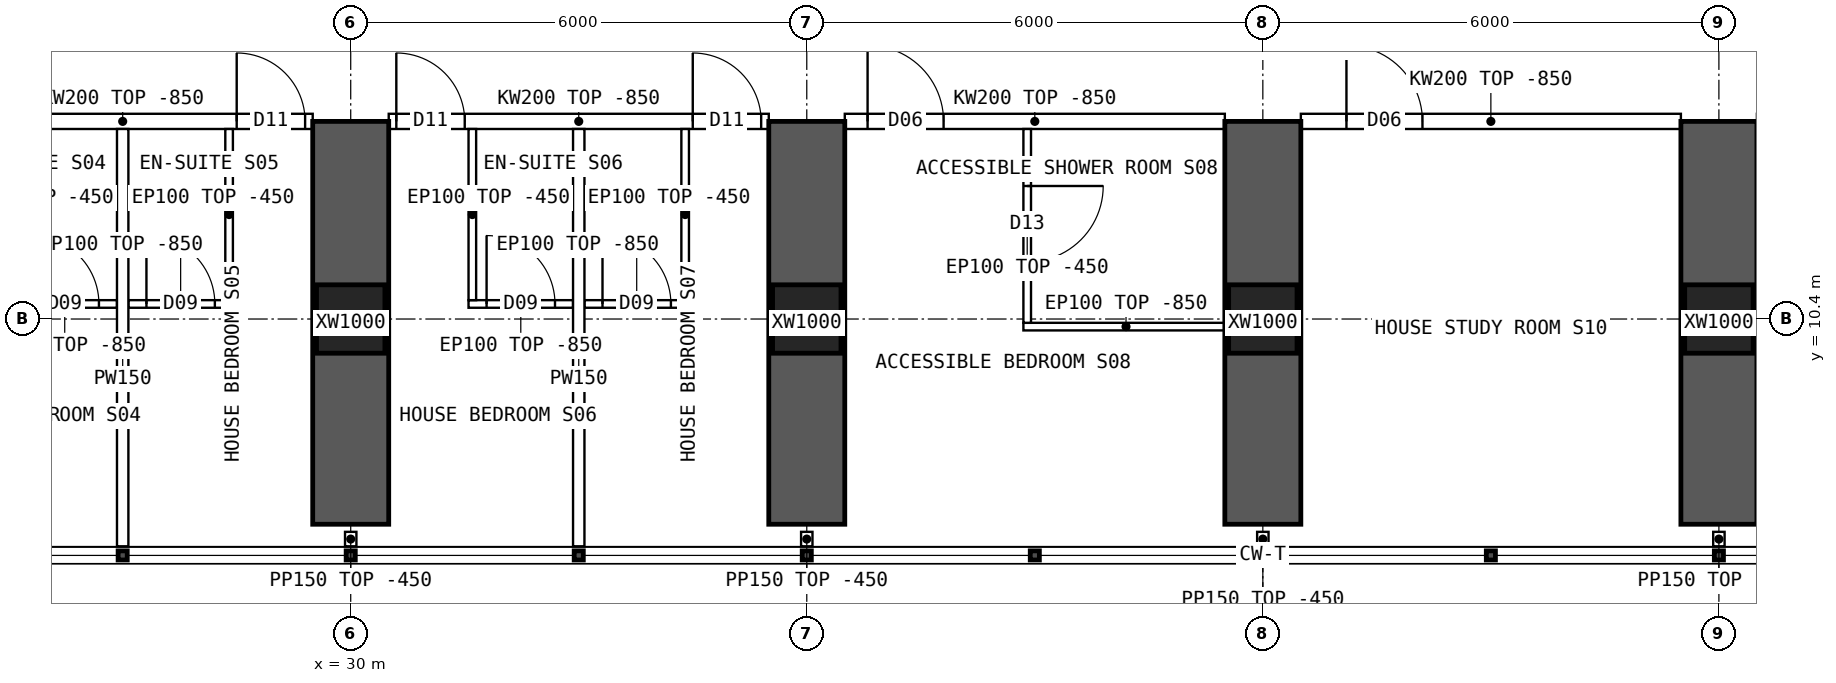
"""IFC4 building model, lengths in metres.
Left out: names, types, materials, properties, quantities, classifications, styles, units other than length and angle.
Written with IfcOpenShell. Run it as: python <this file> out.ifc"""

import sys

from ifc_helpers import new_model, si_unit, direction, frame, frame_2d, origin, origin_2d, place, context, subcontext, project, spatial, polyline, rectangle, hollow_rectangle, outline, extrude, element, fill, save


model = new_model("IFC4")
c1 = context("Model", 3, precision=1e-05, world=origin(), true_north=direction((0.0, 1.0)))
c2 = subcontext(c1, "Body", "Model", "MODEL_VIEW")
j1 = project(units=[si_unit("LENGTHUNIT", "METRE"), si_unit("PLANEANGLEUNIT", "RADIAN")], contexts=[c1])
p1 = place(None, origin())
s1 = spatial("IfcSite", under=j1, at=p1, CompositionType="ELEMENT")
p2 = place(p1, origin())
s2 = spatial("IfcBuilding", under=s1, at=p2, CompositionType="ELEMENT")
p3 = place(p2, frame((0.0, 0.0, 35.2)))
s3 = spatial("IfcBuildingStorey", under=s2, at=p3, CompositionType="ELEMENT", Elevation=35.2)
for number, where, z_axis, x_axis in (
    (1, (30.0, 10.4, 0.0), (0.0, 0.0, 1.0), (1.0, 0.0, 0.0)),
    (2, (36.0, 10.4, 0.0), (0.0, 0.0, 1.0), (1.0, 0.0, 0.0)),
    (3, (42.0, 10.4, 0.0), (0.0, 0.0, 1.0), (1.0, 0.0, 0.0)),
    (4, (48.0, 10.4, 0.0), (0.0, 0.0, 1.0), (1.0, 0.0, 0.0)),
):
    element("IfcColumn", number, at=place(p3, frame(where, z_axis=z_axis, x_axis=x_axis)), inside=s3, PredefinedType="COLUMN", context=c2, shape_type="SweptSolid", body=[
        extrude(hollow_rectangle(XDim=0.9, YDim=0.9, WallThickness=0.09, at=origin_2d()), origin(), (0.0, 0.0, 1.0), 3.75),
    ])
for number, where, z_axis, x_axis in (
    (5, (30.0, 7.7, 0.0), (0.0, 0.0, 1.0), (0.0, 1.0, 0.0)),
    (6, (36.0, 7.7, 0.0), (0.0, 0.0, 1.0), (0.0, 1.0, 0.0)),
    (7, (42.0, 7.7, 0.0), (0.0, 0.0, 1.0), (0.0, 1.0, 0.0)),
    (8, (48.0, 7.7, 0.0), (0.0, 0.0, 1.0), (0.0, 1.0, 0.0)),
):
    element("IfcWall", number, at=place(p3, frame(where, z_axis=z_axis, x_axis=x_axis)), inside=s3, PredefinedType="SHEAR", context=c2, shape_type="SweptSolid", body=[
        extrude(rectangle(XDim=5.3, YDim=1.0, at=frame_2d((2.65, 0.0))), origin(), (0.0, 0.0, 1.0), 3.75),
    ])
p4 = place(p3, frame((24.5, 13.0, 0.0), z_axis=(0.0, 0.0, 1.0), x_axis=(1.0, 0.0, 0.0)))
e9 = element("IfcWall", 9, at=p4, inside=s3, PredefinedType="SOLIDWALL", context=c2, shape_type="SweptSolid", body=[
    extrude(outline(polyline([(0.0, 0.0), (5.0, 0.0), (5.0, 2.9), (0.0, 2.9), (0.0, 0.0)])), frame((0.0, 0.1, 0.0), z_axis=(0.0, -1.0, 0.0), x_axis=(1.0, 0.0, 0.0)), (0.0, 0.0, 1.0), 0.2),
])
p5 = place(p4, frame((0.1, 0.0, 0.0)))
e10 = element("IfcOpeningElement", 10, at=p5, cuts=e9, PredefinedType="OPENING", context=c2, shape_type="SweptSolid", body=[
    extrude(rectangle(XDim=0.9, YDim=2.1, at=frame_2d((0.45, 1.05))), frame((0.0, 0.11, 0.0), z_axis=(0.0, -1.0, 0.0), x_axis=(1.0, 0.0, 0.0)), (0.0, 0.0, 1.0), 0.22),
])
p6 = place(p4, frame((4.0, 0.0, 0.0)))
e11 = element("IfcOpeningElement", 11, at=p6, cuts=e9, PredefinedType="OPENING", context=c2, shape_type="SweptSolid", body=[
    extrude(rectangle(XDim=0.9, YDim=2.1, at=frame_2d((0.45, 1.05))), frame((0.0, 0.11, 0.0), z_axis=(0.0, -1.0, 0.0), x_axis=(1.0, 0.0, 0.0)), (0.0, 0.0, 1.0), 0.22),
])
p7 = place(p3, frame((30.5, 13.0, 0.0), z_axis=(0.0, 0.0, 1.0), x_axis=(1.0, 0.0, 0.0)))
e12 = element("IfcWall", 12, at=p7, inside=s3, PredefinedType="SOLIDWALL", context=c2, shape_type="SweptSolid", body=[
    extrude(outline(polyline([(0.0, 0.0), (5.0, 0.0), (5.0, 2.9), (0.0, 2.9), (0.0, 0.0)])), frame((0.0, 0.1, 0.0), z_axis=(0.0, -1.0, 0.0), x_axis=(1.0, 0.0, 0.0)), (0.0, 0.0, 1.0), 0.2),
])
p8 = place(p7, frame((0.1, 0.0, 0.0)))
e13 = element("IfcOpeningElement", 13, at=p8, cuts=e12, PredefinedType="OPENING", context=c2, shape_type="SweptSolid", body=[
    extrude(rectangle(XDim=0.9, YDim=2.1, at=frame_2d((0.45, 1.05))), frame((0.0, 0.11, 0.0), z_axis=(0.0, -1.0, 0.0), x_axis=(1.0, 0.0, 0.0)), (0.0, 0.0, 1.0), 0.22),
])
p9 = place(p7, frame((4.0, 0.0, 0.0)))
e14 = element("IfcOpeningElement", 14, at=p9, cuts=e12, PredefinedType="OPENING", context=c2, shape_type="SweptSolid", body=[
    extrude(rectangle(XDim=0.9, YDim=2.1, at=frame_2d((0.45, 1.05))), frame((0.0, 0.11, 0.0), z_axis=(0.0, -1.0, 0.0), x_axis=(1.0, 0.0, 0.0)), (0.0, 0.0, 1.0), 0.22),
])
p10 = place(p3, frame((36.5, 13.0, 0.0), z_axis=(0.0, 0.0, 1.0), x_axis=(1.0, 0.0, 0.0)))
e15 = element("IfcWall", 15, at=p10, inside=s3, PredefinedType="SOLIDWALL", context=c2, shape_type="SweptSolid", body=[
    extrude(outline(polyline([(0.0, 0.0), (5.0, 0.0), (5.0, 2.9), (0.0, 2.9), (0.0, 0.0)])), frame((0.0, 0.1, 0.0), z_axis=(0.0, -1.0, 0.0), x_axis=(1.0, 0.0, 0.0)), (0.0, 0.0, 1.0), 0.2),
])
p11 = place(p10, frame((0.3, 0.0, 0.0)))
e16 = element("IfcOpeningElement", 16, at=p11, cuts=e15, PredefinedType="OPENING", context=c2, shape_type="SweptSolid", body=[
    extrude(rectangle(XDim=1.0, YDim=2.1, at=frame_2d((0.5, 1.05))), frame((0.0, 0.11, 0.0), z_axis=(0.0, -1.0, 0.0), x_axis=(1.0, 0.0, 0.0)), (0.0, 0.0, 1.0), 0.22),
])
p12 = place(p3, frame((42.5, 13.0, 0.0), z_axis=(0.0, 0.0, 1.0), x_axis=(1.0, 0.0, 0.0)))
e17 = element("IfcWall", 17, at=p12, inside=s3, PredefinedType="SOLIDWALL", context=c2, shape_type="SweptSolid", body=[
    extrude(outline(polyline([(0.0, 0.0), (5.0, 0.0), (5.0, 2.9), (0.0, 2.9), (0.0, 0.0)])), frame((0.0, 0.1, 0.0), z_axis=(0.0, -1.0, 0.0), x_axis=(1.0, 0.0, 0.0)), (0.0, 0.0, 1.0), 0.2),
])
p13 = place(p12, frame((0.6, 0.0, 0.0)))
e18 = element("IfcOpeningElement", 18, at=p13, cuts=e17, PredefinedType="OPENING", context=c2, shape_type="SweptSolid", body=[
    extrude(rectangle(XDim=1.0, YDim=2.1, at=frame_2d((0.5, 1.05))), frame((0.0, 0.11, 0.0), z_axis=(0.0, -1.0, 0.0), x_axis=(1.0, 0.0, 0.0)), (0.0, 0.0, 1.0), 0.22),
])
p14 = place(p3, frame((27.0, 7.41, 0.0), z_axis=(0.0, 0.0, 1.0), x_axis=(0.0, 1.0, 0.0)))
e19 = element("IfcWall", 19, at=p14, inside=s3, PredefinedType="PARTITIONING", context=c2, shape_type="SweptSolid", body=[
    extrude(outline(polyline([(0.0, 0.0), (5.49, 0.0), (5.49, 2.9), (5.442, 2.9), (5.44, 3.3), (3.192, 3.3), (3.19, 2.9), (2.792, 2.9), (2.79, 3.3), (0.0, 3.3), (0.0, 0.0)])), frame((0.0, 0.075, 0.0), z_axis=(0.0, -1.0, 0.0), x_axis=(1.0, 0.0, 0.0)), (0.0, 0.0, 1.0), 0.15),
])
p15 = place(p3, frame((26.925, 10.598, 0.0), z_axis=(0.0, 0.0, 1.0), x_axis=(-1.0, 0.0, 0.0)))
e20 = element("IfcWall", 20, at=p15, inside=s3, PredefinedType="PARTITIONING", context=c2, shape_type="SweptSolid", body=[
    extrude(outline(polyline([(0.0, 0.0), (1.375, 0.0), (1.375, 2.9), (0.0, 2.9), (0.0, 0.0)])), frame((0.0, 0.05, 0.0), z_axis=(0.0, -1.0, 0.0), x_axis=(1.0, 0.0, 0.0)), (0.0, 0.0, 1.0), 0.1),
])
p16 = place(p15, frame((0.238, 0.0, 0.0)))
e21 = element("IfcOpeningElement", 21, at=p16, cuts=e20, PredefinedType="OPENING", context=c2, shape_type="SweptSolid", body=[
    extrude(rectangle(XDim=0.9, YDim=2.1, at=frame_2d((0.45, 1.05))), frame((0.0, 0.06, 0.0), z_axis=(0.0, -1.0, 0.0), x_axis=(1.0, 0.0, 0.0)), (0.0, 0.0, 1.0), 0.12),
])
p17 = place(p3, frame((28.45, 10.598, 0.0), z_axis=(0.0, 0.0, 1.0), x_axis=(-1.0, 0.0, 0.0)))
e22 = element("IfcWall", 22, at=p17, inside=s3, PredefinedType="PARTITIONING", context=c2, shape_type="SweptSolid", body=[
    extrude(outline(polyline([(0.0, 0.0), (1.375, 0.0), (1.375, 2.9), (0.0, 2.9), (0.0, 0.0)])), frame((0.0, 0.05, 0.0), z_axis=(0.0, -1.0, 0.0), x_axis=(1.0, 0.0, 0.0)), (0.0, 0.0, 1.0), 0.1),
])
p18 = place(p17, frame((0.238, 0.0, 0.0)))
e23 = element("IfcOpeningElement", 23, at=p18, cuts=e22, PredefinedType="OPENING", context=c2, shape_type="SweptSolid", body=[
    extrude(rectangle(XDim=0.9, YDim=2.1, at=frame_2d((0.45, 1.05))), frame((0.0, 0.06, 0.0), z_axis=(0.0, -1.0, 0.0), x_axis=(1.0, 0.0, 0.0)), (0.0, 0.0, 1.0), 0.12),
])
p19 = place(p3, frame((28.4, 10.648, 0.0), z_axis=(0.0, 0.0, 1.0), x_axis=(0.0, 1.0, 0.0)))
e24 = element("IfcWall", 24, at=p19, inside=s3, PredefinedType="PARTITIONING", context=c2, shape_type="SweptSolid", body=[
    extrude(outline(polyline([(0.0, 0.0), (2.252, 0.0), (2.252, 2.9), (2.204, 2.9), (2.202, 3.3), (0.0, 3.3), (0.0, 0.0)])), frame((0.0, 0.05, 0.0), z_axis=(0.0, -1.0, 0.0), x_axis=(1.0, 0.0, 0.0)), (0.0, 0.0, 1.0), 0.1),
])
p20 = place(p3, frame((33.0, 7.41, 0.0), z_axis=(0.0, 0.0, 1.0), x_axis=(0.0, 1.0, 0.0)))
e25 = element("IfcWall", 25, at=p20, inside=s3, PredefinedType="PARTITIONING", context=c2, shape_type="SweptSolid", body=[
    extrude(outline(polyline([(0.0, 0.0), (5.49, 0.0), (5.49, 2.9), (5.442, 2.9), (5.44, 3.3), (3.192, 3.3), (3.19, 2.9), (2.792, 2.9), (2.79, 3.3), (0.0, 3.3), (0.0, 0.0)])), frame((0.0, 0.075, 0.0), z_axis=(0.0, -1.0, 0.0), x_axis=(1.0, 0.0, 0.0)), (0.0, 0.0, 1.0), 0.15),
])
p21 = place(p3, frame((32.925, 10.598, 0.0), z_axis=(0.0, 0.0, 1.0), x_axis=(-1.0, 0.0, 0.0)))
e26 = element("IfcWall", 26, at=p21, inside=s3, PredefinedType="PARTITIONING", context=c2, shape_type="SweptSolid", body=[
    extrude(outline(polyline([(0.0, 0.0), (1.375, 0.0), (1.375, 2.9), (0.0, 2.9), (0.0, 0.0)])), frame((0.0, 0.05, 0.0), z_axis=(0.0, -1.0, 0.0), x_axis=(1.0, 0.0, 0.0)), (0.0, 0.0, 1.0), 0.1),
])
p22 = place(p21, frame((0.238, 0.0, 0.0)))
e27 = element("IfcOpeningElement", 27, at=p22, cuts=e26, PredefinedType="OPENING", context=c2, shape_type="SweptSolid", body=[
    extrude(rectangle(XDim=0.9, YDim=2.1, at=frame_2d((0.45, 1.05))), frame((0.0, 0.06, 0.0), z_axis=(0.0, -1.0, 0.0), x_axis=(1.0, 0.0, 0.0)), (0.0, 0.0, 1.0), 0.12),
])
p23 = place(p3, frame((31.6, 10.648, 0.0), z_axis=(0.0, 0.0, 1.0), x_axis=(0.0, 1.0, 0.0)))
e28 = element("IfcWall", 28, at=p23, inside=s3, PredefinedType="PARTITIONING", context=c2, shape_type="SweptSolid", body=[
    extrude(outline(polyline([(0.0, 0.0), (2.252, 0.0), (2.252, 2.9), (2.204, 2.9), (2.202, 3.3), (0.0, 3.3), (0.0, 0.0)])), frame((0.0, 0.05, 0.0), z_axis=(0.0, -1.0, 0.0), x_axis=(1.0, 0.0, 0.0)), (0.0, 0.0, 1.0), 0.1),
])
p24 = place(p3, frame((34.45, 10.598, 0.0), z_axis=(0.0, 0.0, 1.0), x_axis=(-1.0, 0.0, 0.0)))
e29 = element("IfcWall", 29, at=p24, inside=s3, PredefinedType="PARTITIONING", context=c2, shape_type="SweptSolid", body=[
    extrude(outline(polyline([(0.0, 0.0), (1.375, 0.0), (1.375, 2.9), (0.0, 2.9), (0.0, 0.0)])), frame((0.0, 0.05, 0.0), z_axis=(0.0, -1.0, 0.0), x_axis=(1.0, 0.0, 0.0)), (0.0, 0.0, 1.0), 0.1),
])
p25 = place(p24, frame((0.238, 0.0, 0.0)))
e30 = element("IfcOpeningElement", 30, at=p25, cuts=e29, PredefinedType="OPENING", context=c2, shape_type="SweptSolid", body=[
    extrude(rectangle(XDim=0.9, YDim=2.1, at=frame_2d((0.45, 1.05))), frame((0.0, 0.06, 0.0), z_axis=(0.0, -1.0, 0.0), x_axis=(1.0, 0.0, 0.0)), (0.0, 0.0, 1.0), 0.12),
])
p26 = place(p3, frame((34.4, 10.648, 0.0), z_axis=(0.0, 0.0, 1.0), x_axis=(0.0, 1.0, 0.0)))
e31 = element("IfcWall", 31, at=p26, inside=s3, PredefinedType="PARTITIONING", context=c2, shape_type="SweptSolid", body=[
    extrude(outline(polyline([(0.0, 0.0), (2.252, 0.0), (2.252, 2.9), (2.204, 2.9), (2.202, 3.3), (0.0, 3.3), (0.0, 0.0)])), frame((0.0, 0.05, 0.0), z_axis=(0.0, -1.0, 0.0), x_axis=(1.0, 0.0, 0.0)), (0.0, 0.0, 1.0), 0.1),
])
p27 = place(p3, frame((38.85, 10.3, 0.0), z_axis=(0.0, 0.0, 1.0), x_axis=(1.0, 0.0, 0.0)))
e32 = element("IfcWall", 32, at=p27, inside=s3, PredefinedType="PARTITIONING", context=c2, shape_type="SweptSolid", body=[
    extrude(outline(polyline([(0.0, 0.0), (2.7, 0.0), (2.7, 2.9), (0.0, 2.9), (0.0, 0.0)])), frame((0.0, 0.05, 0.0), z_axis=(0.0, -1.0, 0.0), x_axis=(1.0, 0.0, 0.0)), (0.0, 0.0, 1.0), 0.1),
])
p28 = place(p3, frame((38.9, 10.35, 0.0), z_axis=(0.0, 0.0, 1.0), x_axis=(0.0, 1.0, 0.0)))
e33 = element("IfcWall", 33, at=p28, inside=s3, PredefinedType="PARTITIONING", context=c2, shape_type="SweptSolid", body=[
    extrude(outline(polyline([(0.0, 0.0), (2.55, 0.0), (2.55, 2.9), (2.502, 2.9), (2.5, 3.3), (0.252, 3.3), (0.25, 2.9), (0.0, 2.9), (0.0, 0.0)])), frame((0.0, 0.05, 0.0), z_axis=(0.0, -1.0, 0.0), x_axis=(1.0, 0.0, 0.0)), (0.0, 0.0, 1.0), 0.1),
])
p29 = place(p28, frame((0.8, 0.0, 0.0)))
e34 = element("IfcOpeningElement", 34, at=p29, cuts=e33, PredefinedType="OPENING", context=c2, shape_type="SweptSolid", body=[
    extrude(rectangle(XDim=1.0, YDim=2.1, at=frame_2d((0.5, 1.05))), frame((0.0, 0.06, 0.0), z_axis=(0.0, -1.0, 0.0), x_axis=(1.0, 0.0, 0.0)), (0.0, 0.0, 1.0), 0.12),
])
for number, where, z_axis, x_axis in (
    (35, (30.0, 7.6, 0.0), (0.0, 0.0, 1.0), (0.0, -1.0, 0.0)),
    (36, (36.0, 7.6, 0.0), (0.0, 0.0, 1.0), (0.0, -1.0, 0.0)),
    (37, (42.0, 7.6, 0.0), (0.0, 0.0, 1.0), (0.0, -1.0, 0.0)),
    (38, (48.0, 7.6, 0.0), (0.0, 0.0, 1.0), (0.0, -1.0, 0.0)),
):
    element("IfcWall", number, at=place(p3, frame(where, z_axis=z_axis, x_axis=x_axis)), inside=s3, PredefinedType="PARTITIONING", context=c2, shape_type="SweptSolid", body=[
        extrude(rectangle(XDim=0.19, YDim=0.15, at=frame_2d((0.095, 0.0))), origin(), (0.0, 0.0, 1.0), 3.3),
    ])
p30 = place(p16, origin())
e39 = element("IfcDoor", 39, at=p30, inside=s3, OperationType="SINGLE_SWING_RIGHT", PredefinedType="DOOR", context=c2, shape_type="SweptSolid", body=[
    extrude(rectangle(XDim=0.9, YDim=2.1, at=frame_2d((0.45, 1.05))), frame((0.0, 0.025, 0.0), z_axis=(0.0, -1.0, 0.0), x_axis=(1.0, 0.0, 0.0)), (0.0, 0.0, 1.0), 0.05),
])
fill(e21, e39)
p31 = place(p18, origin())
e40 = element("IfcDoor", 40, at=p31, inside=s3, OperationType="SINGLE_SWING_RIGHT", PredefinedType="DOOR", context=c2, shape_type="SweptSolid", body=[
    extrude(rectangle(XDim=0.9, YDim=2.1, at=frame_2d((0.45, 1.05))), frame((0.0, 0.025, 0.0), z_axis=(0.0, -1.0, 0.0), x_axis=(1.0, 0.0, 0.0)), (0.0, 0.0, 1.0), 0.05),
])
fill(e23, e40)
p32 = place(p6, origin())
e41 = element("IfcDoor", 41, at=p32, inside=s3, OperationType="SINGLE_SWING_LEFT", PredefinedType="DOOR", context=c2, shape_type="SweptSolid", body=[
    extrude(rectangle(XDim=0.9, YDim=2.1, at=frame_2d((0.45, 1.05))), frame((0.0, 0.025, 0.0), z_axis=(0.0, -1.0, 0.0), x_axis=(1.0, 0.0, 0.0)), (0.0, 0.0, 1.0), 0.05),
])
fill(e11, e41)
p33 = place(p22, origin())
e42 = element("IfcDoor", 42, at=p33, inside=s3, OperationType="SINGLE_SWING_RIGHT", PredefinedType="DOOR", context=c2, shape_type="SweptSolid", body=[
    extrude(rectangle(XDim=0.9, YDim=2.1, at=frame_2d((0.45, 1.05))), frame((0.0, 0.025, 0.0), z_axis=(0.0, -1.0, 0.0), x_axis=(1.0, 0.0, 0.0)), (0.0, 0.0, 1.0), 0.05),
])
fill(e27, e42)
p34 = place(p8, origin())
e43 = element("IfcDoor", 43, at=p34, inside=s3, OperationType="SINGLE_SWING_LEFT", PredefinedType="DOOR", context=c2, shape_type="SweptSolid", body=[
    extrude(rectangle(XDim=0.9, YDim=2.1, at=frame_2d((0.45, 1.05))), frame((0.0, 0.025, 0.0), z_axis=(0.0, -1.0, 0.0), x_axis=(1.0, 0.0, 0.0)), (0.0, 0.0, 1.0), 0.05),
])
fill(e13, e43)
p35 = place(p25, origin())
e44 = element("IfcDoor", 44, at=p35, inside=s3, OperationType="SINGLE_SWING_RIGHT", PredefinedType="DOOR", context=c2, shape_type="SweptSolid", body=[
    extrude(rectangle(XDim=0.9, YDim=2.1, at=frame_2d((0.45, 1.05))), frame((0.0, 0.025, 0.0), z_axis=(0.0, -1.0, 0.0), x_axis=(1.0, 0.0, 0.0)), (0.0, 0.0, 1.0), 0.05),
])
fill(e30, e44)
p36 = place(p9, origin())
e45 = element("IfcDoor", 45, at=p36, inside=s3, OperationType="SINGLE_SWING_LEFT", PredefinedType="DOOR", context=c2, shape_type="SweptSolid", body=[
    extrude(rectangle(XDim=0.9, YDim=2.1, at=frame_2d((0.45, 1.05))), frame((0.0, 0.025, 0.0), z_axis=(0.0, -1.0, 0.0), x_axis=(1.0, 0.0, 0.0)), (0.0, 0.0, 1.0), 0.05),
])
fill(e14, e45)
p37 = place(p29, origin())
e46 = element("IfcDoor", 46, at=p37, inside=s3, OperationType="SINGLE_SWING_RIGHT", PredefinedType="DOOR", context=c2, shape_type="SweptSolid", body=[
    extrude(rectangle(XDim=1.0, YDim=2.1, at=frame_2d((0.5, 1.05))), frame((0.0, 0.025, 0.0), z_axis=(0.0, -1.0, 0.0), x_axis=(1.0, 0.0, 0.0)), (0.0, 0.0, 1.0), 0.05),
])
fill(e34, e46)
p38 = place(p11, origin())
e47 = element("IfcDoor", 47, at=p38, inside=s3, OperationType="SINGLE_SWING_LEFT", PredefinedType="DOOR", context=c2, shape_type="SweptSolid", body=[
    extrude(rectangle(XDim=1.0, YDim=2.1, at=frame_2d((0.5, 1.05))), frame((0.0, 0.025, 0.0), z_axis=(0.0, -1.0, 0.0), x_axis=(1.0, 0.0, 0.0)), (0.0, 0.0, 1.0), 0.05),
])
fill(e16, e47)
p39 = place(p13, origin())
e48 = element("IfcDoor", 48, at=p39, inside=s3, OperationType="SINGLE_SWING_LEFT", PredefinedType="DOOR", context=c2, shape_type="SweptSolid", body=[
    extrude(rectangle(XDim=1.0, YDim=2.1, at=frame_2d((0.5, 1.05))), frame((0.0, 0.025, 0.0), z_axis=(0.0, -1.0, 0.0), x_axis=(1.0, 0.0, 0.0)), (0.0, 0.0, 1.0), 0.05),
])
fill(e18, e48)
save(model, sys.argv[1])
